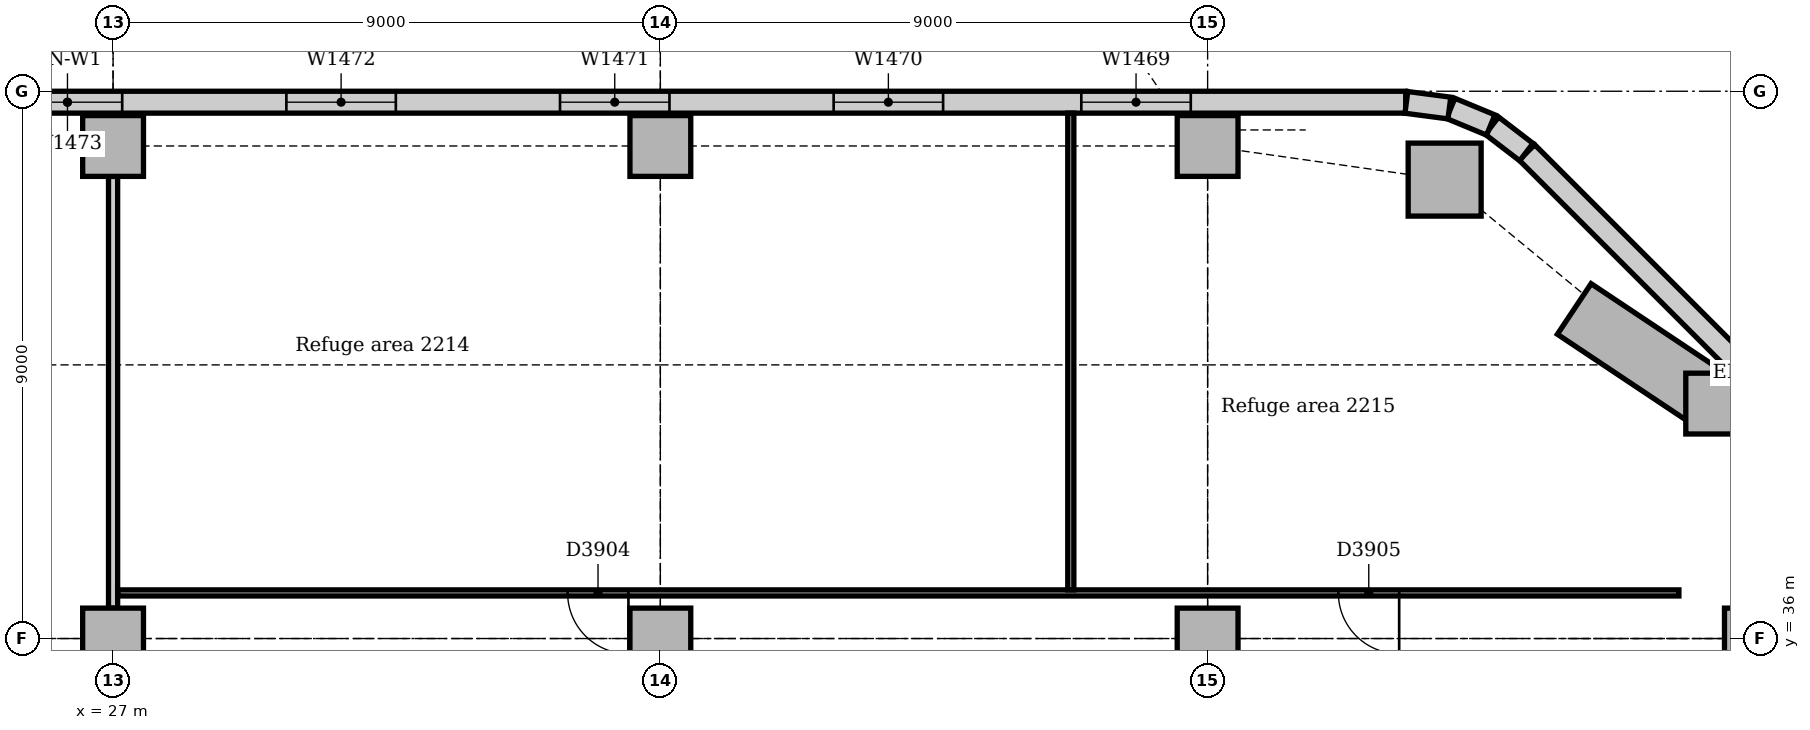
"""IFC4 building model, lengths in metres.
Left out: names, types, materials, properties, quantities, classifications, styles, units other than length and angle.
Written with IfcOpenShell. Run it as: python <this file> out.ifc"""

import sys

from ifc_helpers import new_model, si_unit, direction, frame, frame_2d, origin, origin_2d, place, context, subcontext, project, spatial, rectangle, extrude, element, fill, save


model = new_model("IFC4")
c1 = context("Model", 3, precision=1e-05, world=origin(), true_north=direction((0.0, 1.0)))
c2 = subcontext(c1, "Body", "Model", "MODEL_VIEW")
j1 = project(units=[si_unit("LENGTHUNIT", "METRE"), si_unit("PLANEANGLEUNIT", "RADIAN")], contexts=[c1])
p1 = place(None, origin())
s1 = spatial("IfcSite", under=j1, at=p1, CompositionType="ELEMENT")
p2 = place(p1, origin())
s2 = spatial("IfcBuilding", under=s1, at=p2, CompositionType="ELEMENT")
p3 = place(p2, frame((0.0, 0.0, 95.0)))
s3 = spatial("IfcBuildingStorey", under=s2, at=p3, CompositionType="ELEMENT", Elevation=95.0)
p4 = place(p3, frame((48.898, 43.547, 0.0), z_axis=(0.0, 0.0, 1.0), x_axis=(1.0, 0.0, 0.0)))
e1 = element("IfcColumn", 1, at=p4, inside=s3, PredefinedType="COLUMN", context=c2, shape_type="SweptSolid", body=[
    extrude(rectangle(XDim=1.2, YDim=1.2, at=origin_2d()), origin(), (0.0, 0.0, 1.0), 4.85),
])
for number, where, z_axis, x_axis in (
    (2, (53.364, 39.864, 0.0), (0.0, 0.0, 1.0), (1.0, 0.0, 0.0)),
    (3, (27.0, 44.1, 0.0), (0.0, 0.0, 1.0), (1.0, 0.0, 0.0)),
    (4, (36.0, 44.1, 0.0), (0.0, 0.0, 1.0), (1.0, 0.0, 0.0)),
    (5, (45.0, 44.1, 0.0), (0.0, 0.0, 1.0), (1.0, 0.0, 0.0)),
    (6, (27.0, 36.0, 0.0), (0.0, 0.0, 1.0), (1.0, 0.0, 0.0)),
    (7, (36.0, 36.0, 0.0), (0.0, 0.0, 1.0), (1.0, 0.0, 0.0)),
    (8, (45.0, 36.0, 0.0), (0.0, 0.0, 1.0), (1.0, 0.0, 0.0)),
    (9, (54.0, 36.0, 0.0), (0.0, 0.0, 1.0), (1.0, 0.0, 0.0)),
):
    element("IfcColumn", number, at=place(p3, frame(where, z_axis=z_axis, x_axis=x_axis)), inside=s3, PredefinedType="COLUMN", context=c2, shape_type="SweptSolid", body=[
        extrude(rectangle(XDim=1.0, YDim=1.0, at=origin_2d()), origin(), (0.0, 0.0, 1.0), 4.85),
    ])
p5 = place(p3, frame((57.494, 36.751, 0.0), z_axis=(0.0, 0.0, 1.0), x_axis=(-0.707106781187, 0.707106781187, 0.0)))
e10 = element("IfcWall", 10, at=p5, inside=s3, PredefinedType="STANDARD", context=c2, shape_type="SweptSolid", body=[
    extrude(rectangle(XDim=10.243, YDim=0.36, at=frame_2d((5.121, 0.0))), origin(), (0.0, 0.0, 1.0), 3.25),
])
p6 = place(p3, frame((48.257, 44.82, 0.0), z_axis=(0.0, 0.0, 1.0), x_axis=(-1.0, 0.0, 0.0)))
e11 = element("IfcWall", 11, at=p6, inside=s3, PredefinedType="STANDARD", context=c2, shape_type="SweptSolid", body=[
    extrude(rectangle(XDim=44.015, YDim=0.36, at=frame_2d((22.007, 0.0))), origin(), (0.0, 0.0, 1.0), 3.25),
])
p7 = place(p6, frame((3.534, 0.0, 1.2)))
e12 = element("IfcOpeningElement", 12, at=p7, cuts=e11, PredefinedType="OPENING", context=c2, shape_type="SweptSolid", body=[
    extrude(rectangle(XDim=1.8, YDim=1.2, at=frame_2d((0.9, 0.6))), frame((0.0, 0.19, 0.0), z_axis=(0.0, -1.0, 0.0), x_axis=(1.0, 0.0, 0.0)), (0.0, 0.0, 1.0), 0.38),
])
p8 = place(p6, frame((7.607, 0.0, 1.2)))
e13 = element("IfcOpeningElement", 13, at=p8, cuts=e11, PredefinedType="OPENING", context=c2, shape_type="SweptSolid", body=[
    extrude(rectangle(XDim=1.8, YDim=1.2, at=frame_2d((0.9, 0.6))), frame((0.0, 0.19, 0.0), z_axis=(0.0, -1.0, 0.0), x_axis=(1.0, 0.0, 0.0)), (0.0, 0.0, 1.0), 0.38),
])
p9 = place(p6, frame((12.107, 0.0, 1.2)))
e14 = element("IfcOpeningElement", 14, at=p9, cuts=e11, PredefinedType="OPENING", context=c2, shape_type="SweptSolid", body=[
    extrude(rectangle(XDim=1.8, YDim=1.2, at=frame_2d((0.9, 0.6))), frame((0.0, 0.19, 0.0), z_axis=(0.0, -1.0, 0.0), x_axis=(1.0, 0.0, 0.0)), (0.0, 0.0, 1.0), 0.38),
])
p10 = place(p6, frame((16.607, 0.0, 1.2)))
e15 = element("IfcOpeningElement", 15, at=p10, cuts=e11, PredefinedType="OPENING", context=c2, shape_type="SweptSolid", body=[
    extrude(rectangle(XDim=1.8, YDim=1.2, at=frame_2d((0.9, 0.6))), frame((0.0, 0.19, 0.0), z_axis=(0.0, -1.0, 0.0), x_axis=(1.0, 0.0, 0.0)), (0.0, 0.0, 1.0), 0.38),
])
p11 = place(p6, frame((21.107, 0.0, 1.2)))
e16 = element("IfcOpeningElement", 16, at=p11, cuts=e11, PredefinedType="OPENING", context=c2, shape_type="SweptSolid", body=[
    extrude(rectangle(XDim=1.8, YDim=1.2, at=frame_2d((0.9, 0.6))), frame((0.0, 0.19, 0.0), z_axis=(0.0, -1.0, 0.0), x_axis=(1.0, 0.0, 0.0)), (0.0, 0.0, 1.0), 0.38),
])
p12 = place(p6, frame((25.607, 0.0, 1.2)))
e17 = element("IfcOpeningElement", 17, at=p12, cuts=e11, PredefinedType="OPENING", context=c2, shape_type="SweptSolid", body=[
    extrude(rectangle(XDim=1.8, YDim=1.2, at=frame_2d((0.9, 0.6))), frame((0.0, 0.19, 0.0), z_axis=(0.0, -1.0, 0.0), x_axis=(1.0, 0.0, 0.0)), (0.0, 0.0, 1.0), 0.38),
])
p13 = place(p6, frame((30.107, 0.0, 1.2)))
e18 = element("IfcOpeningElement", 18, at=p13, cuts=e11, PredefinedType="OPENING", context=c2, shape_type="SweptSolid", body=[
    extrude(rectangle(XDim=1.8, YDim=1.2, at=frame_2d((0.9, 0.6))), frame((0.0, 0.19, 0.0), z_axis=(0.0, -1.0, 0.0), x_axis=(1.0, 0.0, 0.0)), (0.0, 0.0, 1.0), 0.38),
])
p14 = place(p6, frame((34.607, 0.0, 1.2)))
e19 = element("IfcOpeningElement", 19, at=p14, cuts=e11, PredefinedType="OPENING", context=c2, shape_type="SweptSolid", body=[
    extrude(rectangle(XDim=1.8, YDim=1.2, at=frame_2d((0.9, 0.6))), frame((0.0, 0.19, 0.0), z_axis=(0.0, -1.0, 0.0), x_axis=(1.0, 0.0, 0.0)), (0.0, 0.0, 1.0), 0.38),
])
p15 = place(p6, frame((39.107, 0.0, 1.2)))
e20 = element("IfcOpeningElement", 20, at=p15, cuts=e11, PredefinedType="OPENING", context=c2, shape_type="SweptSolid", body=[
    extrude(rectangle(XDim=1.8, YDim=1.2, at=frame_2d((0.9, 0.6))), frame((0.0, 0.19, 0.0), z_axis=(0.0, -1.0, 0.0), x_axis=(1.0, 0.0, 0.0)), (0.0, 0.0, 1.0), 0.38),
])
p16 = place(p3, frame((50.241, 44.0, 0.0), z_axis=(0.0, 0.0, 1.0), x_axis=(-0.793321924995, 0.608802368033, 0.0)))
e21 = element("IfcWall", 21, at=p16, inside=s3, PredefinedType="STANDARD", context=c2, shape_type="SweptSolid", body=[
    extrude(rectangle(XDim=0.713, YDim=0.36, at=frame_2d((0.357, 0.0))), origin(), (0.0, 0.0, 1.0), 3.25),
])
for number, where, z_axis, x_axis in (
    (22, (49.656, 44.445, 0.0), (0.0, 0.0, 1.0), (-0.924, 0.383, 0.0)),
    (23, (48.976, 44.724, 0.0), (0.0, 0.0, 1.0), (-0.991, 0.131, 0.0)),
):
    element("IfcWall", number, at=place(p3, frame(where, z_axis=z_axis, x_axis=x_axis)), inside=s3, PredefinedType="STANDARD", context=c2, shape_type="SweptSolid", body=[
        extrude(rectangle(XDim=0.713, YDim=0.36, at=frame_2d((0.356, 0.0))), origin(), (0.0, 0.0, 1.0), 3.25),
    ])
p17 = place(p3, frame((27.0, 36.5, 0.0), z_axis=(0.0, 0.0, 1.0), x_axis=(0.0, 1.0, 0.0)))
e24 = element("IfcWall", 24, at=p17, inside=s3, PredefinedType="PARTITIONING", context=c2, shape_type="SweptSolid", body=[
    extrude(rectangle(XDim=7.1, YDim=0.15, at=frame_2d((3.55, 0.0))), origin(), (0.0, 0.0, 1.0), 4.256),
])
p18 = place(p3, frame((27.075, 36.75, 0.0), z_axis=(0.0, 0.0, 1.0), x_axis=(1.0, 0.0, 0.0)))
e25 = element("IfcWall", 25, at=p18, inside=s3, PredefinedType="PARTITIONING", context=c2, shape_type="SweptSolid", body=[
    extrude(rectangle(XDim=25.675, YDim=0.1, at=frame_2d((12.838, 0.0))), origin(), (0.0, 0.0, 1.0), 4.85),
])
p19 = place(p18, frame((7.4, 0.0, 0.0)))
e26 = element("IfcOpeningElement", 26, at=p19, cuts=e25, PredefinedType="OPENING", context=c2, shape_type="SweptSolid", body=[
    extrude(rectangle(XDim=1.0, YDim=2.1, at=frame_2d((0.5, 1.05))), frame((0.0, 0.06, 0.0), z_axis=(0.0, -1.0, 0.0), x_axis=(1.0, 0.0, 0.0)), (0.0, 0.0, 1.0), 0.12),
])
p20 = place(p18, frame((20.075, 0.0, 0.0)))
e27 = element("IfcOpeningElement", 27, at=p20, cuts=e25, PredefinedType="OPENING", context=c2, shape_type="SweptSolid", body=[
    extrude(rectangle(XDim=1.0, YDim=2.1, at=frame_2d((0.5, 1.05))), frame((0.0, 0.06, 0.0), z_axis=(0.0, -1.0, 0.0), x_axis=(1.0, 0.0, 0.0)), (0.0, 0.0, 1.0), 0.12),
])
p21 = place(p3, frame((42.75, 36.8, 0.0), z_axis=(0.0, 0.0, 1.0), x_axis=(0.0, 1.0, 0.0)))
e28 = element("IfcWall", 28, at=p21, inside=s3, PredefinedType="PARTITIONING", context=c2, shape_type="SweptSolid", body=[
    extrude(rectangle(XDim=7.84, YDim=0.1, at=frame_2d((3.92, 0.0))), origin(), (0.0, 0.0, 1.0), 4.85),
])
p22 = place(p7, origin())
e29 = element("IfcWindow", 29, at=p22, inside=s3, PartitioningType="SINGLE_PANEL", PredefinedType="WINDOW", context=c2, shape_type="SweptSolid", body=[
    extrude(rectangle(XDim=1.8, YDim=1.2, at=frame_2d((0.9, 0.6))), frame((0.0, 0.13, 0.0), z_axis=(0.0, -1.0, 0.0), x_axis=(1.0, 0.0, 0.0)), (0.0, 0.0, 1.0), 0.06),
])
fill(e12, e29)
p23 = place(p8, origin())
e30 = element("IfcWindow", 30, at=p23, inside=s3, PartitioningType="SINGLE_PANEL", PredefinedType="WINDOW", context=c2, shape_type="SweptSolid", body=[
    extrude(rectangle(XDim=1.8, YDim=1.2, at=frame_2d((0.9, 0.6))), frame((0.0, 0.13, 0.0), z_axis=(0.0, -1.0, 0.0), x_axis=(1.0, 0.0, 0.0)), (0.0, 0.0, 1.0), 0.06),
])
fill(e13, e30)
p24 = place(p9, origin())
e31 = element("IfcWindow", 31, at=p24, inside=s3, PartitioningType="SINGLE_PANEL", PredefinedType="WINDOW", context=c2, shape_type="SweptSolid", body=[
    extrude(rectangle(XDim=1.8, YDim=1.2, at=frame_2d((0.9, 0.6))), frame((0.0, 0.13, 0.0), z_axis=(0.0, -1.0, 0.0), x_axis=(1.0, 0.0, 0.0)), (0.0, 0.0, 1.0), 0.06),
])
fill(e14, e31)
p25 = place(p10, origin())
e32 = element("IfcWindow", 32, at=p25, inside=s3, PartitioningType="SINGLE_PANEL", PredefinedType="WINDOW", context=c2, shape_type="SweptSolid", body=[
    extrude(rectangle(XDim=1.8, YDim=1.2, at=frame_2d((0.9, 0.6))), frame((0.0, 0.13, 0.0), z_axis=(0.0, -1.0, 0.0), x_axis=(1.0, 0.0, 0.0)), (0.0, 0.0, 1.0), 0.06),
])
fill(e15, e32)
p26 = place(p11, origin())
e33 = element("IfcWindow", 33, at=p26, inside=s3, PartitioningType="SINGLE_PANEL", PredefinedType="WINDOW", context=c2, shape_type="SweptSolid", body=[
    extrude(rectangle(XDim=1.8, YDim=1.2, at=frame_2d((0.9, 0.6))), frame((0.0, 0.13, 0.0), z_axis=(0.0, -1.0, 0.0), x_axis=(1.0, 0.0, 0.0)), (0.0, 0.0, 1.0), 0.06),
])
fill(e16, e33)
p27 = place(p19, frame((1.0, 0.0, 0.0), z_axis=(0.0, 0.0, 1.0), x_axis=(-1.0, 0.0, 0.0)))
e34 = element("IfcDoor", 34, at=p27, inside=s3, OperationType="SINGLE_SWING_LEFT", PredefinedType="DOOR", context=c2, shape_type="SweptSolid", body=[
    extrude(rectangle(XDim=1.0, YDim=2.1, at=frame_2d((0.5, 1.05))), frame((0.0, 0.025, 0.0), z_axis=(0.0, -1.0, 0.0), x_axis=(1.0, 0.0, 0.0)), (0.0, 0.0, 1.0), 0.05),
])
fill(e26, e34)
p28 = place(p20, frame((1.0, 0.0, 0.0), z_axis=(0.0, 0.0, 1.0), x_axis=(-1.0, 0.0, 0.0)))
e35 = element("IfcDoor", 35, at=p28, inside=s3, OperationType="SINGLE_SWING_LEFT", PredefinedType="DOOR", context=c2, shape_type="SweptSolid", body=[
    extrude(rectangle(XDim=1.0, YDim=2.1, at=frame_2d((0.5, 1.05))), frame((0.0, 0.025, 0.0), z_axis=(0.0, -1.0, 0.0), x_axis=(1.0, 0.0, 0.0)), (0.0, 0.0, 1.0), 0.05),
])
fill(e27, e35)
save(model, sys.argv[1])
